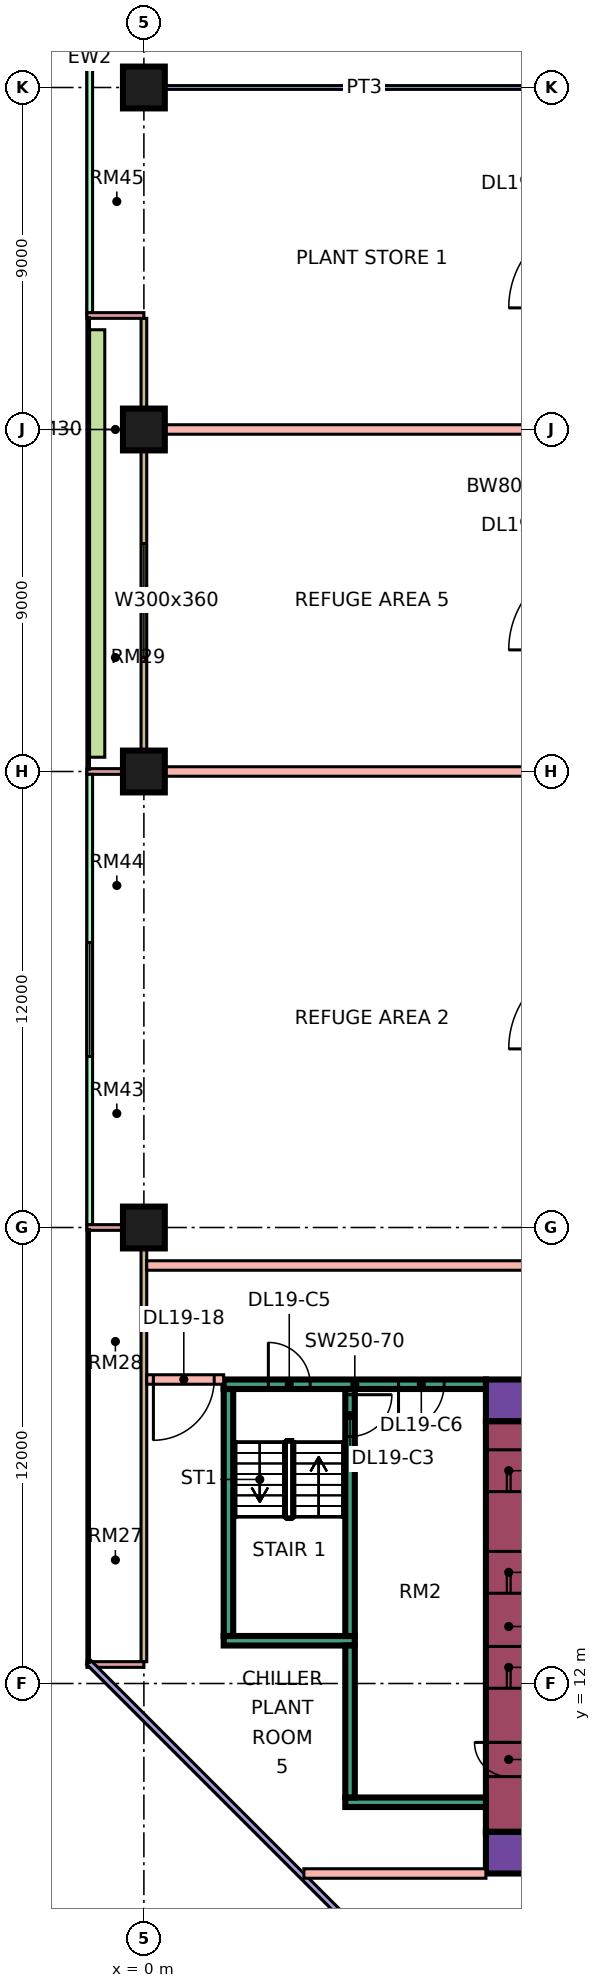
"""IFC4 building model, lengths in metres.
Left out: names, types, materials, properties, quantities, classifications, styles, units other than length and angle.
Written with IfcOpenShell. Run it as: python <this file> out.ifc"""

import sys

from ifc_helpers import new_model, si_unit, direction, frame, frame_2d, origin, origin_2d, place, context, subcontext, project, spatial, rectangle, extrude, element, fill, save


model = new_model("IFC4")
c1 = context("Model", 3, precision=1e-05, world=origin(), true_north=direction((0.0, 1.0)))
c2 = subcontext(c1, "Body", "Model", "MODEL_VIEW")
j1 = project(units=[si_unit("LENGTHUNIT", "METRE"), si_unit("PLANEANGLEUNIT", "RADIAN")], contexts=[c1])
p1 = place(None, origin())
s1 = spatial("IfcSite", under=j1, at=p1, CompositionType="ELEMENT")
p2 = place(p1, origin())
s2 = spatial("IfcBuilding", under=s1, at=p2, CompositionType="ELEMENT")
p3 = place(p2, frame((0.0, 0.0, 86.4)))
s3 = spatial("IfcBuildingStorey", under=s2, at=p3, CompositionType="ELEMENT", Elevation=86.4)
p4 = place(p3, frame((0.0, 24.0, 0.0), z_axis=(0.0, 0.0, 1.0), x_axis=(1.0, 0.0, 0.0)))
e1 = element("IfcColumn", 1, at=p4, inside=s3, PredefinedType="COLUMN", context=c2, shape_type="SweptSolid", body=[
    extrude(rectangle(XDim=1.1, YDim=1.1, at=origin_2d()), origin(), (0.0, 0.0, 1.0), 5.5),
])
p5 = place(p3, frame((0.0, 36.0, 0.0), z_axis=(0.0, 0.0, 1.0), x_axis=(1.0, 0.0, 0.0)))
e2 = element("IfcColumn", 2, at=p5, inside=s3, PredefinedType="COLUMN", context=c2, shape_type="SweptSolid", body=[
    extrude(rectangle(XDim=1.1, YDim=1.1, at=origin_2d()), origin(), (0.0, 0.0, 1.0), 5.5),
])
p6 = place(p3, frame((0.0, 45.0, 0.0), z_axis=(0.0, 0.0, 1.0), x_axis=(1.0, 0.0, 0.0)))
e3 = element("IfcColumn", 3, at=p6, inside=s3, PredefinedType="COLUMN", context=c2, shape_type="SweptSolid", body=[
    extrude(rectangle(XDim=1.1, YDim=1.1, at=origin_2d()), origin(), (0.0, 0.0, 1.0), 5.5),
])
p7 = place(p3, frame((0.0, 54.0, 0.0), z_axis=(0.0, 0.0, 1.0), x_axis=(1.0, 0.0, 0.0)))
e4 = element("IfcColumn", 4, at=p7, inside=s3, PredefinedType="COLUMN", context=c2, shape_type="SweptSolid", body=[
    extrude(rectangle(XDim=1.1, YDim=1.1, at=origin_2d()), origin(), (0.0, 0.0, 1.0), 5.5),
])
p8 = place(p3, frame((9.0, 7.55, 0.0), z_axis=(0.0, 0.0, 1.0), x_axis=(1.0, 0.0, 0.0)))
e5 = element("IfcWall", 5, at=p8, inside=s3, PredefinedType="SHEAR", context=c2, shape_type="SweptSolid", body=[
    extrude(rectangle(XDim=25.0, YDim=1.1, at=frame_2d((12.5, 0.0))), origin(), (0.0, 0.0, 1.0), 5.5),
])
p9 = place(p3, frame((9.0, 19.45, 0.0), z_axis=(0.0, 0.0, 1.0), x_axis=(1.0, 0.0, 0.0)))
e6 = element("IfcWall", 6, at=p9, inside=s3, PredefinedType="SHEAR", context=c2, shape_type="SweptSolid", body=[
    extrude(rectangle(XDim=25.0, YDim=1.1, at=frame_2d((12.5, 0.0))), origin(), (0.0, 0.0, 1.0), 5.5),
])
p10 = place(p9, frame((19.1, 0.0, 0.0)))
e7 = element("IfcOpeningElement", 7, at=p10, cuts=e6, PredefinedType="OPENING", context=c2, shape_type="SweptSolid", body=[
    extrude(rectangle(XDim=1.8, YDim=2.4, at=frame_2d((0.9, 1.2))), frame((0.0, 0.56, 0.0), z_axis=(0.0, -1.0, 0.0), x_axis=(1.0, 0.0, 0.0)), (0.0, 0.0, 1.0), 1.12),
])
p11 = place(p3, frame((9.6, 8.1, 0.0), z_axis=(0.0, 0.0, 1.0), x_axis=(0.0, 1.0, 0.0)))
e8 = element("IfcWall", 8, at=p11, inside=s3, PredefinedType="SHEAR", context=c2, shape_type="SweptSolid", body=[
    extrude(rectangle(XDim=10.8, YDim=1.2, at=frame_2d((5.4, 0.0))), origin(), (0.0, 0.0, 1.0), 5.5),
])
p12 = place(p11, frame((3.775, 0.0, 0.0)))
e9 = element("IfcOpeningElement", 9, at=p12, cuts=e8, PredefinedType="OPENING", context=c2, shape_type="SweptSolid", body=[
    extrude(rectangle(XDim=1.1, YDim=2.2, at=frame_2d((0.55, 1.1))), frame((0.0, 0.61, 0.0), z_axis=(0.0, -1.0, 0.0), x_axis=(1.0, 0.0, 0.0)), (0.0, 0.0, 1.0), 1.22),
])
p13 = place(p11, frame((6.275, 0.0, 0.0)))
e10 = element("IfcOpeningElement", 10, at=p13, cuts=e8, PredefinedType="OPENING", context=c2, shape_type="SweptSolid", body=[
    extrude(rectangle(XDim=1.1, YDim=2.2, at=frame_2d((0.55, 1.1))), frame((0.0, 0.61, 0.0), z_axis=(0.0, -1.0, 0.0), x_axis=(1.0, 0.0, 0.0)), (0.0, 0.0, 1.0), 1.22),
])
p14 = place(p11, frame((8.95, 0.0, 0.0)))
e11 = element("IfcOpeningElement", 11, at=p14, cuts=e8, PredefinedType="OPENING", context=c2, shape_type="SweptSolid", body=[
    extrude(rectangle(XDim=1.1, YDim=2.2, at=frame_2d((0.55, 1.1))), frame((0.0, 0.61, 0.0), z_axis=(0.0, -1.0, 0.0), x_axis=(1.0, 0.0, 0.0)), (0.0, 0.0, 1.0), 1.22),
])
p15 = place(p11, frame((1.45, 0.0, 0.0)))
e12 = element("IfcOpeningElement", 12, at=p15, cuts=e8, PredefinedType="OPENING", context=c2, shape_type="SweptSolid", body=[
    extrude(rectangle(XDim=0.9, YDim=2.1, at=frame_2d((0.45, 1.05))), frame((0.0, 0.61, 0.0), z_axis=(0.0, -1.0, 0.0), x_axis=(1.0, 0.0, 0.0)), (0.0, 0.0, 1.0), 1.22),
])
p16 = place(p3, frame((2.1, 19.875, 0.0), z_axis=(0.0, 0.0, 1.0), x_axis=(1.0, 0.0, 0.0)))
e13 = element("IfcWall", 13, at=p16, inside=s3, PredefinedType="SHEAR", context=c2, shape_type="SweptSolid", body=[
    extrude(rectangle(XDim=6.9, YDim=0.25, at=frame_2d((3.45, 0.0))), origin(), (0.0, 0.0, 1.0), 5.5),
])
p17 = place(p16, frame((1.175, 0.0, 0.0)))
e14 = element("IfcOpeningElement", 14, at=p17, cuts=e13, PredefinedType="OPENING", context=c2, shape_type="SweptSolid", body=[
    extrude(rectangle(XDim=1.1, YDim=2.2, at=frame_2d((0.55, 1.1))), frame((0.0, 0.135, 0.0), z_axis=(0.0, -1.0, 0.0), x_axis=(1.0, 0.0, 0.0)), (0.0, 0.0, 1.0), 0.27),
])
p18 = place(p16, frame((4.6, 0.0, 0.0)))
e15 = element("IfcOpeningElement", 15, at=p18, cuts=e13, PredefinedType="OPENING", context=c2, shape_type="SweptSolid", body=[
    extrude(rectangle(XDim=1.2, YDim=2.2, at=frame_2d((0.6, 1.1))), frame((0.0, 0.135, 0.0), z_axis=(0.0, -1.0, 0.0), x_axis=(1.0, 0.0, 0.0)), (0.0, 0.0, 1.0), 0.27),
])
p19 = place(p3, frame((2.1, 13.125, 0.0), z_axis=(0.0, 0.0, 1.0), x_axis=(1.0, 0.0, 0.0)))
e16 = element("IfcWall", 16, at=p19, inside=s3, PredefinedType="SHEAR", context=c2, shape_type="SweptSolid", body=[
    extrude(rectangle(XDim=3.45, YDim=0.25, at=frame_2d((1.725, 0.0))), origin(), (0.0, 0.0, 1.0), 5.5),
])
p20 = place(p3, frame((2.225, 13.25, 0.0), z_axis=(0.0, 0.0, 1.0), x_axis=(0.0, 1.0, 0.0)))
e17 = element("IfcWall", 17, at=p20, inside=s3, PredefinedType="SHEAR", context=c2, shape_type="SweptSolid", body=[
    extrude(rectangle(XDim=6.5, YDim=0.25, at=frame_2d((3.25, 0.0))), origin(), (0.0, 0.0, 1.0), 5.5),
])
p21 = place(p3, frame((5.425, 13.25, 0.0), z_axis=(0.0, 0.0, 1.0), x_axis=(0.0, 1.0, 0.0)))
e18 = element("IfcWall", 18, at=p21, inside=s3, PredefinedType="SHEAR", context=c2, shape_type="SweptSolid", body=[
    extrude(rectangle(XDim=6.5, YDim=0.25, at=frame_2d((3.25, 0.0))), origin(), (0.0, 0.0, 1.0), 5.5),
])
p22 = place(p21, frame((5.25, 0.0, 0.0)))
e19 = element("IfcOpeningElement", 19, at=p22, cuts=e18, PredefinedType="OPENING", context=c2, shape_type="SweptSolid", body=[
    extrude(rectangle(XDim=1.1, YDim=2.2, at=frame_2d((0.55, 1.1))), frame((0.0, 0.135, 0.0), z_axis=(0.0, -1.0, 0.0), x_axis=(1.0, 0.0, 0.0)), (0.0, 0.0, 1.0), 0.27),
])
p23 = place(p3, frame((5.3, 8.875, 0.0), z_axis=(0.0, 0.0, 1.0), x_axis=(1.0, 0.0, 0.0)))
e20 = element("IfcWall", 20, at=p23, inside=s3, PredefinedType="SHEAR", context=c2, shape_type="SweptSolid", body=[
    extrude(rectangle(XDim=3.7, YDim=0.25, at=frame_2d((1.85, 0.0))), origin(), (0.0, 0.0, 1.0), 5.5),
])
p24 = place(p3, frame((5.425, 9.0, 0.0), z_axis=(0.0, 0.0, 1.0), x_axis=(0.0, 1.0, 0.0)))
e21 = element("IfcWall", 21, at=p24, inside=s3, PredefinedType="SHEAR", context=c2, shape_type="SweptSolid", body=[
    extrude(rectangle(XDim=4.0, YDim=0.25, at=frame_2d((2.0, 0.0))), origin(), (0.0, 0.0, 1.0), 5.5),
])
p25 = place(p3, frame((-1.425, 61.5, 0.0), z_axis=(0.0, 0.0, 1.0), x_axis=(0.0, -1.0, 0.0)))
e22 = element("IfcWall", 22, at=p25, inside=s3, PredefinedType="SOLIDWALL", context=c2, shape_type="SweptSolid", body=[
    extrude(rectangle(XDim=13.425, YDim=0.15, at=frame_2d((6.712, 0.0))), origin(), (0.0, 0.0, 1.0), 5.1),
])
p26 = place(p3, frame((0.0, 47.925, 0.0), z_axis=(0.0, 0.0, 1.0), x_axis=(0.0, -1.0, 0.0)))
e23 = element("IfcWall", 23, at=p26, inside=s3, PredefinedType="SOLIDWALL", context=c2, shape_type="SweptSolid", body=[
    extrude(rectangle(XDim=11.85, YDim=0.15, at=frame_2d((5.925, 0.0))), origin(), (0.0, 0.0, 1.0), 5.1),
])
p27 = place(p26, frame((5.925, 0.0, 0.45)))
e24 = element("IfcOpeningElement", 24, at=p27, cuts=e23, PredefinedType="OPENING", context=c2, shape_type="SweptSolid", body=[
    extrude(rectangle(XDim=3.0, YDim=3.6, at=frame_2d((1.5, 1.8))), frame((0.0, 0.085, 0.0), z_axis=(0.0, -1.0, 0.0), x_axis=(1.0, 0.0, 0.0)), (0.0, 0.0, 1.0), 0.17),
])
for number, where, z_axis, x_axis in (
    (25, (-1.5, 48.0, 0.0), (0.0, 0.0, 1.0), (1.0, 0.0, 0.0)),
    (26, (-1.5, 36.0, 0.0), (0.0, 0.0, 1.0), (1.0, 0.0, 0.0)),
):
    element("IfcWall", number, at=place(p3, frame(where, z_axis=z_axis, x_axis=x_axis)), inside=s3, PredefinedType="SOLIDWALL", context=c2, shape_type="SweptSolid", body=[
        extrude(rectangle(XDim=1.5, YDim=0.15, at=frame_2d((0.75, 0.0))), origin(), (0.0, 0.0, 1.0), 5.1),
    ])
p28 = place(p3, frame((-1.425, 35.925, 0.0), z_axis=(0.0, 0.0, 1.0), x_axis=(0.0, -1.0, 0.0)))
e27 = element("IfcWall", 27, at=p28, inside=s3, PredefinedType="SOLIDWALL", context=c2, shape_type="SweptSolid", body=[
    extrude(rectangle(XDim=11.85, YDim=0.15, at=frame_2d((5.925, 0.0))), origin(), (0.0, 0.0, 1.0), 5.1),
])
p29 = place(p28, frame((4.425, 0.0, 0.45)))
e28 = element("IfcOpeningElement", 28, at=p29, cuts=e27, PredefinedType="OPENING", context=c2, shape_type="SweptSolid", body=[
    extrude(rectangle(XDim=3.0, YDim=3.6, at=frame_2d((1.5, 1.8))), frame((0.0, 0.085, 0.0), z_axis=(0.0, -1.0, 0.0), x_axis=(1.0, 0.0, 0.0)), (0.0, 0.0, 1.0), 0.17),
])
p30 = place(p3, frame((0.0, 23.925, 0.0), z_axis=(0.0, 0.0, 1.0), x_axis=(0.0, -1.0, 0.0)))
e29 = element("IfcWall", 29, at=p30, inside=s3, PredefinedType="SOLIDWALL", context=c2, shape_type="SweptSolid", body=[
    extrude(rectangle(XDim=11.35, YDim=0.15, at=frame_2d((5.675, 0.0))), origin(), (0.0, 0.0, 1.0), 5.1),
])
for number, where, z_axis, x_axis in (
    (30, (-1.5, 24.0, 0.0), (0.0, 0.0, 1.0), (1.0, 0.0, 0.0)),
    (31, (-1.5, 12.5, 0.0), (0.0, 0.0, 1.0), (1.0, 0.0, 0.0)),
):
    element("IfcWall", number, at=place(p3, frame(where, z_axis=z_axis, x_axis=x_axis)), inside=s3, PredefinedType="SOLIDWALL", context=c2, shape_type="SweptSolid", body=[
        extrude(rectangle(XDim=1.5, YDim=0.15, at=frame_2d((0.75, 0.0))), origin(), (0.0, 0.0, 1.0), 5.1),
    ])
p31 = place(p3, frame((-1.447, 12.553, 0.0), z_axis=(0.0, 0.0, 1.0), x_axis=(0.707106781187, -0.707106781187, 0.0)))
e32 = element("IfcWall", 32, at=p31, inside=s3, PredefinedType="SOLIDWALL", context=c2, shape_type="SweptSolid", body=[
    extrude(rectangle(XDim=19.799, YDim=0.15, at=frame_2d((9.899, 0.0))), origin(), (0.0, 0.0, 1.0), 5.1),
])
p32 = place(p31, frame((11.453, 0.0, 0.45)))
e33 = element("IfcOpeningElement", 33, at=p32, cuts=e32, PredefinedType="OPENING", context=c2, shape_type="SweptSolid", body=[
    extrude(rectangle(XDim=3.0, YDim=3.6, at=frame_2d((1.5, 1.8))), frame((0.0, 0.085, 0.0), z_axis=(0.0, -1.0, 0.0), x_axis=(1.0, 0.0, 0.0)), (0.0, 0.0, 1.0), 0.17),
])
p33 = place(p3, frame((-1.229, 47.625, 0.0), z_axis=(0.0, 0.0, 1.0), x_axis=(0.0, -1.0, 0.0)))
e34 = element("IfcWall", 34, at=p33, inside=s3, PredefinedType="SOLIDWALL", context=c2, shape_type="SweptSolid", body=[
    extrude(rectangle(XDim=11.25, YDim=0.4, at=frame_2d((5.625, 0.0))), origin(), (0.0, 0.0, 1.0), 0.7),
])
e35 = element("IfcWall", 35, at=p5, inside=s3, PredefinedType="PARTITIONING", context=c2, shape_type="SweptSolid", body=[
    extrude(rectangle(XDim=11.601, YDim=0.25, at=frame_2d((5.801, 0.0))), origin(), (0.0, 0.0, 1.0), 5.1),
])
e36 = element("IfcWall", 36, at=p7, inside=s3, PredefinedType="PARTITIONING", context=c2, shape_type="SweptSolid", body=[
    extrude(rectangle(XDim=11.601, YDim=0.1, at=frame_2d((5.801, 0.0))), origin(), (0.0, 0.0, 1.0), 5.1),
])
p34 = place(p3, frame((0.074, 20.0, 0.0), z_axis=(0.0, 0.0, 1.0), x_axis=(1.0, 0.0, 0.0)))
e37 = element("IfcWall", 37, at=p34, inside=s3, PredefinedType="PARTITIONING", context=c2, shape_type="SweptSolid", body=[
    extrude(rectangle(XDim=2.026, YDim=0.25, at=frame_2d((1.013, 0.0))), origin(), (0.0, 0.0, 1.0), 5.1),
])
p35 = place(p34, frame((0.176, 0.0, 0.0)))
e38 = element("IfcOpeningElement", 38, at=p35, cuts=e37, PredefinedType="OPENING", context=c2, shape_type="SweptSolid", body=[
    extrude(rectangle(XDim=1.6, YDim=2.1, at=frame_2d((0.8, 1.05))), frame((0.0, 0.135, 0.0), z_axis=(0.0, -1.0, 0.0), x_axis=(1.0, 0.0, 0.0)), (0.0, 0.0, 1.0), 0.27),
])
p36 = place(p3, frame((0.074, 23.0, 0.0), z_axis=(0.0, 0.0, 1.0), x_axis=(1.0, 0.0, 0.0)))
e39 = element("IfcWall", 39, at=p36, inside=s3, PredefinedType="PARTITIONING", context=c2, shape_type="SweptSolid", body=[
    extrude(rectangle(XDim=12.051, YDim=0.25, at=frame_2d((6.025, 0.0))), origin(), (0.0, 0.0, 1.0), 5.1),
])
p37 = place(p3, frame((0.074, 45.0, 0.0), z_axis=(0.0, 0.0, 1.0), x_axis=(1.0, 0.0, 0.0)))
e40 = element("IfcWall", 40, at=p37, inside=s3, PredefinedType="PARTITIONING", context=c2, shape_type="SweptSolid", body=[
    extrude(rectangle(XDim=11.527, YDim=0.25, at=frame_2d((5.764, 0.0))), origin(), (0.0, 0.0, 1.0), 5.1),
])
p38 = place(p3, frame((4.211, 7.0, 0.0), z_axis=(0.0, 0.0, 1.0), x_axis=(1.0, 0.0, 0.0)))
e41 = element("IfcWall", 41, at=p38, inside=s3, PredefinedType="PARTITIONING", context=c2, shape_type="SweptSolid", body=[
    extrude(rectangle(XDim=4.789, YDim=0.25, at=frame_2d((2.395, 0.0))), origin(), (0.0, 0.0, 1.0), 5.1),
])
p39 = place(p27, origin())
e42 = element("IfcWindow", 42, at=p39, inside=s3, PartitioningType="SINGLE_PANEL", PredefinedType="WINDOW", context=c2, shape_type="SweptSolid", body=[
    extrude(rectangle(XDim=3.0, YDim=3.6, at=frame_2d((1.5, 1.8))), frame((0.0, 0.03, 0.0), z_axis=(0.0, -1.0, 0.0), x_axis=(1.0, 0.0, 0.0)), (0.0, 0.0, 1.0), 0.06),
])
fill(e24, e42)
p40 = place(p29, origin())
e43 = element("IfcWindow", 43, at=p40, inside=s3, PartitioningType="SINGLE_PANEL", PredefinedType="WINDOW", context=c2, shape_type="SweptSolid", body=[
    extrude(rectangle(XDim=3.0, YDim=3.6, at=frame_2d((1.5, 1.8))), frame((0.0, 0.03, 0.0), z_axis=(0.0, -1.0, 0.0), x_axis=(1.0, 0.0, 0.0)), (0.0, 0.0, 1.0), 0.06),
])
fill(e28, e43)
p41 = place(p12, origin())
e44 = element("IfcDoor", 44, at=p41, inside=s3, OperationType="DOUBLE_DOOR_SLIDING", PredefinedType="DOOR", context=c2, shape_type="SweptSolid", body=[
    extrude(rectangle(XDim=1.1, YDim=2.2, at=frame_2d((0.55, 1.1))), frame((0.0, 0.025, 0.0), z_axis=(0.0, -1.0, 0.0), x_axis=(1.0, 0.0, 0.0)), (0.0, 0.0, 1.0), 0.05),
])
fill(e9, e44)
p42 = place(p13, origin())
e45 = element("IfcDoor", 45, at=p42, inside=s3, OperationType="DOUBLE_DOOR_SLIDING", PredefinedType="DOOR", context=c2, shape_type="SweptSolid", body=[
    extrude(rectangle(XDim=1.1, YDim=2.2, at=frame_2d((0.55, 1.1))), frame((0.0, 0.025, 0.0), z_axis=(0.0, -1.0, 0.0), x_axis=(1.0, 0.0, 0.0)), (0.0, 0.0, 1.0), 0.05),
])
fill(e10, e45)
p43 = place(p14, origin())
e46 = element("IfcDoor", 46, at=p43, inside=s3, OperationType="DOUBLE_DOOR_SLIDING", PredefinedType="DOOR", context=c2, shape_type="SweptSolid", body=[
    extrude(rectangle(XDim=1.1, YDim=2.2, at=frame_2d((0.55, 1.1))), frame((0.0, 0.025, 0.0), z_axis=(0.0, -1.0, 0.0), x_axis=(1.0, 0.0, 0.0)), (0.0, 0.0, 1.0), 0.05),
])
fill(e11, e46)
p44 = place(p22, origin())
e47 = element("IfcDoor", 47, at=p44, inside=s3, OperationType="SINGLE_SWING_RIGHT", PredefinedType="DOOR", context=c2, shape_type="SweptSolid", body=[
    extrude(rectangle(XDim=1.1, YDim=2.2, at=frame_2d((0.55, 1.1))), frame((0.0, 0.025, 0.0), z_axis=(0.0, -1.0, 0.0), x_axis=(1.0, 0.0, 0.0)), (0.0, 0.0, 1.0), 0.05),
])
fill(e19, e47)
p45 = place(p15, frame((0.9, 0.0, 0.0), z_axis=(0.0, 0.0, 1.0), x_axis=(-1.0, 0.0, 0.0)))
e48 = element("IfcDoor", 48, at=p45, inside=s3, OperationType="SINGLE_SWING_RIGHT", PredefinedType="DOOR", context=c2, shape_type="SweptSolid", body=[
    extrude(rectangle(XDim=0.9, YDim=2.1, at=frame_2d((0.45, 1.05))), frame((0.0, 0.025, 0.0), z_axis=(0.0, -1.0, 0.0), x_axis=(1.0, 0.0, 0.0)), (0.0, 0.0, 1.0), 0.05),
])
fill(e12, e48)
p46 = place(p17, origin())
e49 = element("IfcDoor", 49, at=p46, inside=s3, OperationType="SINGLE_SWING_LEFT", PredefinedType="DOOR", context=c2, shape_type="SweptSolid", body=[
    extrude(rectangle(XDim=1.1, YDim=2.2, at=frame_2d((0.55, 1.1))), frame((0.0, 0.025, 0.0), z_axis=(0.0, -1.0, 0.0), x_axis=(1.0, 0.0, 0.0)), (0.0, 0.0, 1.0), 0.05),
])
fill(e14, e49)
p47 = place(p18, frame((1.2, 0.0, 0.0), z_axis=(0.0, 0.0, 1.0), x_axis=(-1.0, 0.0, 0.0)))
e50 = element("IfcDoor", 50, at=p47, inside=s3, OperationType="SINGLE_SWING_LEFT", PredefinedType="DOOR", context=c2, shape_type="SweptSolid", body=[
    extrude(rectangle(XDim=1.2, YDim=2.2, at=frame_2d((0.6, 1.1))), frame((0.0, 0.025, 0.0), z_axis=(0.0, -1.0, 0.0), x_axis=(1.0, 0.0, 0.0)), (0.0, 0.0, 1.0), 0.05),
])
fill(e15, e50)
p48 = place(p35, frame((1.6, 0.0, 0.0), z_axis=(0.0, 0.0, 1.0), x_axis=(-1.0, 0.0, 0.0)))
e51 = element("IfcDoor", 51, at=p48, inside=s3, OperationType="DOUBLE_DOOR_SINGLE_SWING", PredefinedType="DOOR", context=c2, shape_type="SweptSolid", body=[
    extrude(rectangle(XDim=1.6, YDim=2.1, at=frame_2d((0.8, 1.05))), frame((0.0, 0.025, 0.0), z_axis=(0.0, -1.0, 0.0), x_axis=(1.0, 0.0, 0.0)), (0.0, 0.0, 1.0), 0.05),
])
fill(e38, e51)
save(model, sys.argv[1])
